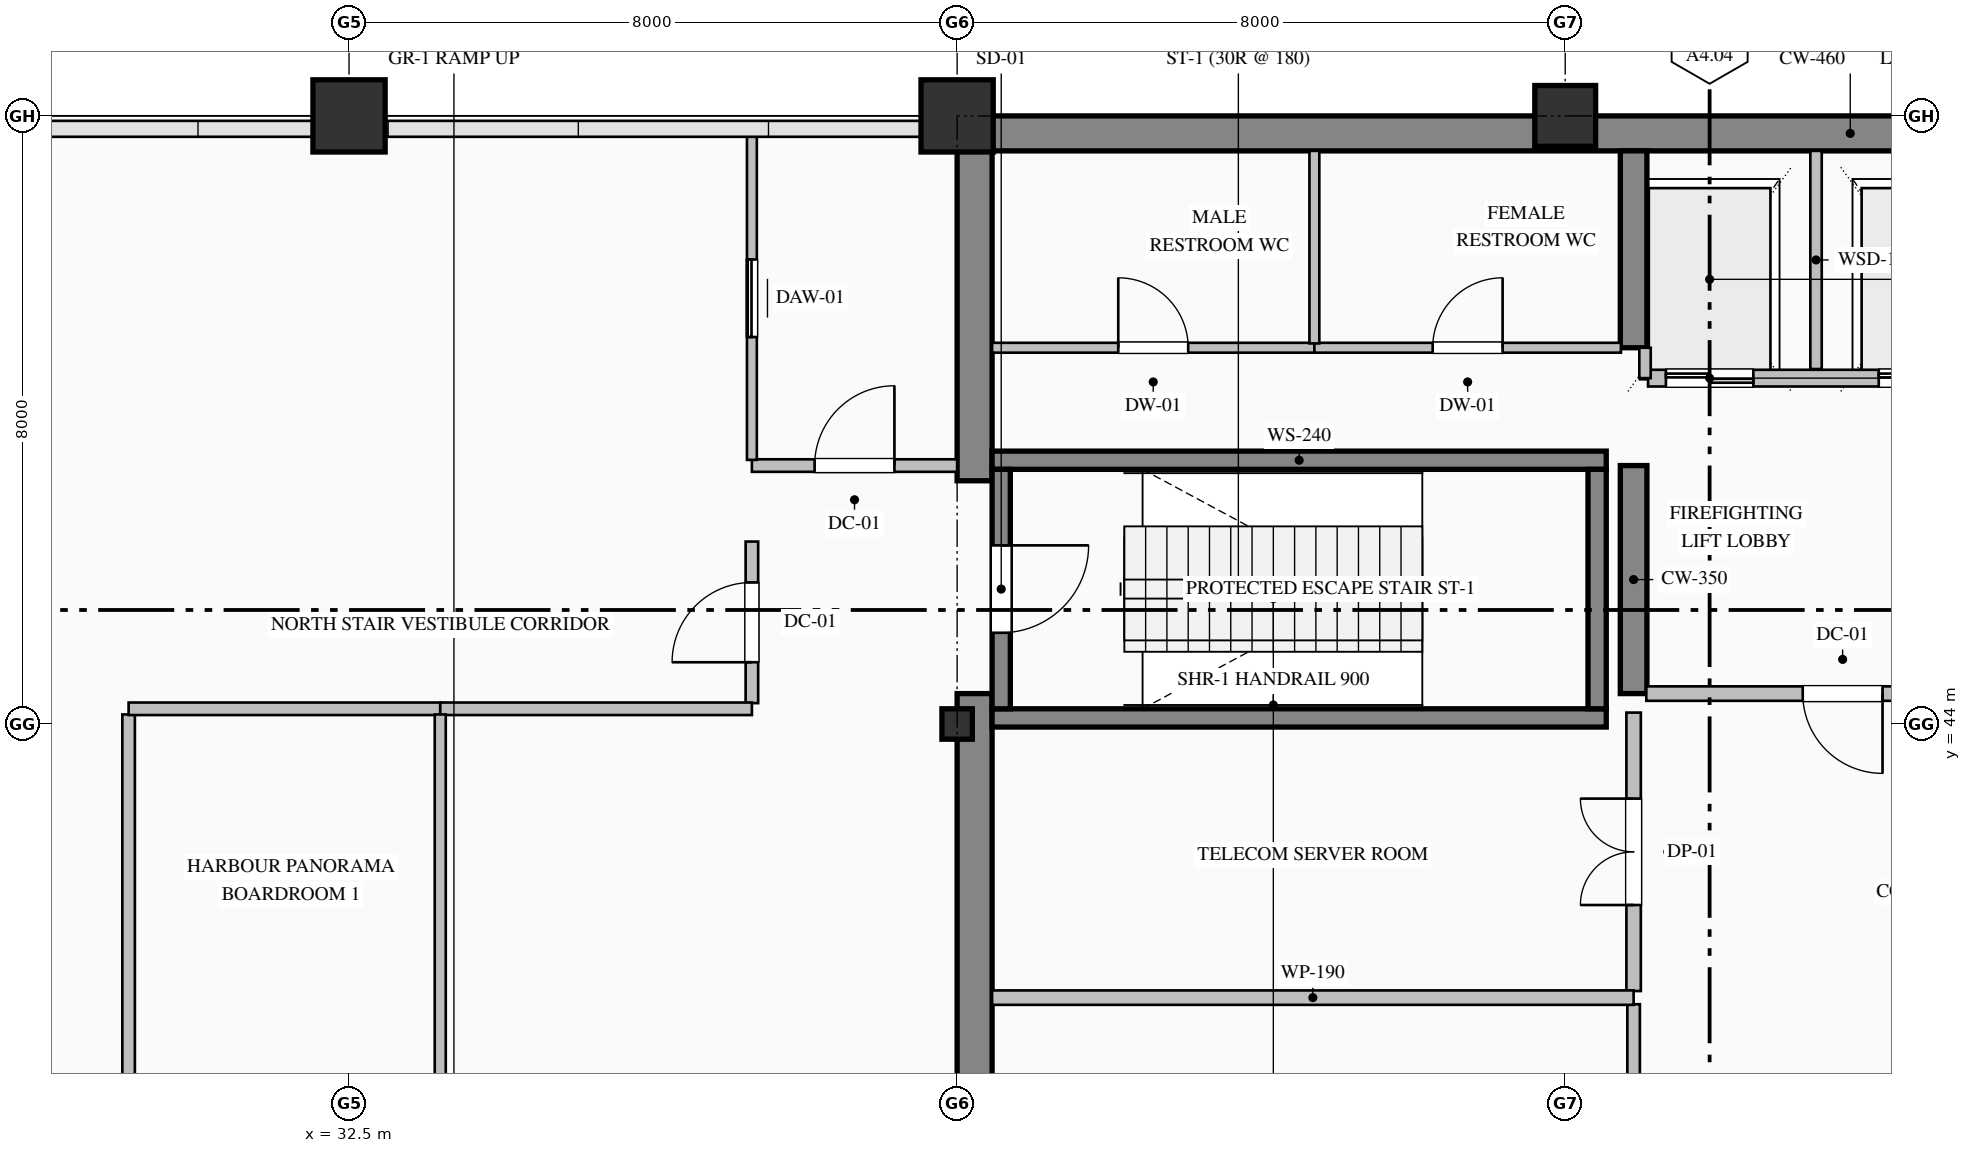
"""IFC4 building model, lengths in metres.
Left out: names, types, materials, properties, quantities, classifications, styles, units other than length and angle.
Written with IfcOpenShell. Run it as: python <this file> out.ifc"""

import sys

from ifc_helpers import new_model, si_unit, direction, frame, frame_2d, origin, origin_2d, place, context, subcontext, project, spatial, rectangle, hollow_rectangle, i_section, extrude, element, fill, save


model = new_model("IFC4")
c1 = context("Model", 3, precision=1e-05, world=origin(), true_north=direction((0.0, 1.0)))
c2 = subcontext(c1, "Body", "Model", "MODEL_VIEW")
j1 = project(units=[si_unit("LENGTHUNIT", "METRE"), si_unit("PLANEANGLEUNIT", "RADIAN")], contexts=[c1])
p1 = place(None, origin())
s1 = spatial("IfcSite", under=j1, at=p1, CompositionType="ELEMENT")
p2 = place(p1, origin())
s2 = spatial("IfcBuilding", under=s1, at=p2, CompositionType="ELEMENT")
p3 = place(p2, frame((0.0, 0.0, 200.4)))
s3 = spatial("IfcBuildingStorey", under=s2, at=p3, CompositionType="ELEMENT", Elevation=200.4)
p4 = place(p3, frame((40.5, 51.77, 0.0), z_axis=(0.0, 0.0, 1.0), x_axis=(1.0, 0.0, 0.0)))
e1 = element("IfcWall", 1, at=p4, inside=s3, PredefinedType="SHEAR", context=c2, shape_type="SweptSolid", body=[
    extrude(rectangle(XDim=23.5, YDim=0.46, at=frame_2d((11.75, 0.0))), origin(), (0.0, 0.0, 1.0), 5.175),
])
p5 = place(p3, frame((40.73, 36.46, 0.0), z_axis=(0.0, 0.0, 1.0), x_axis=(0.0, 1.0, 0.0)))
e2 = element("IfcWall", 2, at=p5, inside=s3, PredefinedType="SHEAR", context=c2, shape_type="SweptSolid", body=[
    extrude(rectangle(XDim=7.94, YDim=0.46, at=frame_2d((3.97, 0.0))), origin(), (0.0, 0.0, 1.0), 5.175),
])
p6 = place(p3, frame((40.73, 47.2, 0.0), z_axis=(0.0, 0.0, 1.0), x_axis=(0.0, 1.0, 0.0)))
e3 = element("IfcWall", 3, at=p6, inside=s3, PredefinedType="SHEAR", context=c2, shape_type="SweptSolid", body=[
    extrude(rectangle(XDim=4.34, YDim=0.46, at=frame_2d((2.17, 0.0))), origin(), (0.0, 0.0, 1.0), 5.175),
])
p7 = place(p3, frame((49.4, 44.4, 0.0), z_axis=(0.0, 0.0, 1.0), x_axis=(0.0, 1.0, 0.0)))
e4 = element("IfcWall", 4, at=p7, inside=s3, PredefinedType="SHEAR", context=c2, shape_type="SweptSolid", body=[
    extrude(rectangle(XDim=3.0, YDim=0.35, at=frame_2d((1.5, 0.0))), origin(), (0.0, 0.0, 1.0), 5.175),
])
p8 = place(p3, frame((49.4, 48.95, 0.0), z_axis=(0.0, 0.0, 1.0), x_axis=(0.0, 1.0, 0.0)))
e5 = element("IfcWall", 5, at=p8, inside=s3, PredefinedType="SHEAR", context=c2, shape_type="SweptSolid", body=[
    extrude(rectangle(XDim=2.59, YDim=0.35, at=frame_2d((1.295, 0.0))), origin(), (0.0, 0.0, 1.0), 5.175),
])
p9 = place(p3, frame((32.5, 52.0, 0.0), z_axis=(0.0, 0.0, 1.0), x_axis=(1.0, 0.0, 0.0)))
e6 = element("IfcColumn", 6, at=p9, inside=s3, PredefinedType="COLUMN", context=c2, shape_type="SweptSolid", body=[
    extrude(hollow_rectangle(XDim=0.95, YDim=0.95, WallThickness=0.036, at=origin_2d()), origin(), (0.0, 0.0, 1.0), 5.4),
])
p10 = place(p3, frame((40.5, 44.0, 0.0), z_axis=(0.0, 0.0, 1.0), x_axis=(1.0, 0.0, 0.0)))
e7 = element("IfcColumn", 7, at=p10, inside=s3, PredefinedType="COLUMN", context=c2, shape_type="SweptSolid", body=[
    extrude(i_section(OverallWidth=0.4, OverallDepth=0.4, WebThickness=0.013, FlangeThickness=0.021, FilletRadius=0.022, at=origin_2d()), origin(), (0.0, 0.0, 1.0), 5.4),
])
p11 = place(p3, frame((40.5, 52.0, 0.0), z_axis=(0.0, 0.0, 1.0), x_axis=(1.0, 0.0, 0.0)))
e8 = element("IfcColumn", 8, at=p11, inside=s3, PredefinedType="COLUMN", context=c2, shape_type="SweptSolid", body=[
    extrude(hollow_rectangle(XDim=0.95, YDim=0.95, WallThickness=0.036, at=origin_2d()), origin(), (0.0, 0.0, 1.0), 5.4),
])
p12 = place(p3, frame((48.5, 52.0, 0.0), z_axis=(0.0, 0.0, 1.0), x_axis=(1.0, 0.0, 0.0)))
e9 = element("IfcColumn", 9, at=p12, inside=s3, PredefinedType="COLUMN", context=c2, shape_type="SweptSolid", body=[
    extrude(hollow_rectangle(XDim=0.8, YDim=0.8, WallThickness=0.032, at=origin_2d()), origin(), (0.0, 0.0, 1.0), 5.4),
])
for number, where, z_axis, x_axis in (
    (10, (40.96, 47.47, 0.0), (0.0, 0.0, 1.0), (1.0, 0.0, 0.0)),
    (11, (49.04, 44.08, 0.0), (0.0, 0.0, 1.0), (-1.0, 0.0, 0.0)),
):
    element("IfcWall", number, at=place(p3, frame(where, z_axis=z_axis, x_axis=x_axis)), inside=s3, PredefinedType="SOLIDWALL", context=c2, shape_type="SweptSolid", body=[
        extrude(rectangle(XDim=8.08, YDim=0.24, at=frame_2d((4.04, 0.0))), origin(), (0.0, 0.0, 1.0), 5.4),
    ])
p13 = place(p3, frame((41.08, 47.35, 0.0), z_axis=(0.0, 0.0, 1.0), x_axis=(0.0, -1.0, 0.0)))
e12 = element("IfcWall", 12, at=p13, inside=s3, PredefinedType="SOLIDWALL", context=c2, shape_type="SweptSolid", body=[
    extrude(rectangle(XDim=3.15, YDim=0.24, at=frame_2d((1.575, 0.0))), origin(), (0.0, 0.0, 1.0), 5.4),
])
p14 = place(p13, frame((1.0, 0.0, 0.0)))
e13 = element("IfcOpeningElement", 13, at=p14, cuts=e12, PredefinedType="OPENING", context=c2, shape_type="SweptSolid", body=[
    extrude(rectangle(XDim=1.15, YDim=2.2, at=frame_2d((0.575, 1.1))), frame((0.0, 0.13, 0.0), z_axis=(0.0, -1.0, 0.0), x_axis=(1.0, 0.0, 0.0)), (0.0, 0.0, 1.0), 0.26),
])
p15 = place(p3, frame((48.92, 44.2, 0.0), z_axis=(0.0, 0.0, 1.0), x_axis=(0.0, 1.0, 0.0)))
e14 = element("IfcWall", 14, at=p15, inside=s3, PredefinedType="SOLIDWALL", context=c2, shape_type="SweptSolid", body=[
    extrude(rectangle(XDim=3.15, YDim=0.24, at=frame_2d((1.575, 0.0))), origin(), (0.0, 0.0, 1.0), 5.4),
])
p16 = place(p3, frame((54.71, 48.55, 0.0), z_axis=(0.0, 0.0, 1.0), x_axis=(-1.0, 0.0, 0.0)))
e15 = element("IfcWall", 15, at=p16, inside=s3, PredefinedType="PARTITIONING", context=c2, shape_type="SweptSolid", body=[
    extrude(rectangle(XDim=5.12, YDim=0.22, at=frame_2d((2.56, 0.0))), origin(), (0.0, 0.0, 1.0), 5.175),
])
p17 = place(p16, frame((3.735, 0.0, 0.0)))
e16 = element("IfcOpeningElement", 16, at=p17, cuts=e15, PredefinedType="OPENING", context=c2, shape_type="SweptSolid", body=[
    extrude(rectangle(XDim=1.15, YDim=2.2, at=frame_2d((0.575, 1.1))), frame((0.0, 0.12, 0.0), z_axis=(0.0, -1.0, 0.0), x_axis=(1.0, 0.0, 0.0)), (0.0, 0.0, 1.0), 0.24),
])
p18 = place(p16, frame((0.935, 0.0, 0.0)))
e17 = element("IfcOpeningElement", 17, at=p18, cuts=e15, PredefinedType="OPENING", context=c2, shape_type="SweptSolid", body=[
    extrude(rectangle(XDim=1.15, YDim=2.2, at=frame_2d((0.575, 1.1))), frame((0.0, 0.12, 0.0), z_axis=(0.0, -1.0, 0.0), x_axis=(1.0, 0.0, 0.0)), (0.0, 0.0, 1.0), 0.24),
])
p19 = place(p3, frame((51.8, 48.67, 0.0), z_axis=(0.0, 0.0, 1.0), x_axis=(0.0, 1.0, 0.0)))
e18 = element("IfcWall", 18, at=p19, inside=s3, PredefinedType="PARTITIONING", context=c2, shape_type="SweptSolid", body=[
    extrude(rectangle(XDim=2.87, YDim=0.15, at=frame_2d((1.435, 0.0))), origin(), (0.0, 0.0, 1.0), 5.175),
])
p20 = place(p3, frame((49.55, 48.55, 0.0), z_axis=(0.0, 0.0, 1.0), x_axis=(0.0, 1.0, 0.0)))
e19 = element("IfcWall", 19, at=p20, inside=s3, PredefinedType="PARTITIONING", context=c2, shape_type="SweptSolid", body=[
    extrude(rectangle(XDim=0.4, YDim=0.15, at=frame_2d((0.2, 0.0))), origin(), (0.0, 0.0, 1.0), 5.175),
])
p21 = place(p3, frame((37.8, 47.4, 0.0), z_axis=(0.0, 0.0, 1.0), x_axis=(1.0, 0.0, 0.0)))
e20 = element("IfcWall", 20, at=p21, inside=s3, PredefinedType="PARTITIONING", context=c2, shape_type="SweptSolid", body=[
    extrude(rectangle(XDim=2.7, YDim=0.165, at=frame_2d((1.35, 0.0))), origin(), (0.0, 0.0, 1.0), 5.175),
])
p22 = place(p21, frame((0.825, 0.0, 0.0)))
e21 = element("IfcOpeningElement", 21, at=p22, cuts=e20, PredefinedType="OPENING", context=c2, shape_type="SweptSolid", body=[
    extrude(rectangle(XDim=1.05, YDim=2.15, at=frame_2d((0.525, 1.075))), frame((0.0, 0.093, 0.0), z_axis=(0.0, -1.0, 0.0), x_axis=(1.0, 0.0, 0.0)), (0.0, 0.0, 1.0), 0.185),
])
p23 = place(p3, frame((37.8, 44.274, 0.0), z_axis=(0.0, 0.0, 1.0), x_axis=(0.0, 1.0, 0.0)))
e22 = element("IfcWall", 22, at=p23, inside=s3, PredefinedType="PARTITIONING", context=c2, shape_type="SweptSolid", body=[
    extrude(rectangle(XDim=2.125, YDim=0.165, at=frame_2d((1.063, 0.0))), origin(), (0.0, 0.0, 1.0), 5.175),
])
p24 = place(p23, frame((0.538, 0.0, 0.0)))
e23 = element("IfcOpeningElement", 23, at=p24, cuts=e22, PredefinedType="OPENING", context=c2, shape_type="SweptSolid", body=[
    extrude(rectangle(XDim=1.05, YDim=2.15, at=frame_2d((0.525, 1.075))), frame((0.0, 0.093, 0.0), z_axis=(0.0, -1.0, 0.0), x_axis=(1.0, 0.0, 0.0)), (0.0, 0.0, 1.0), 0.185),
])
p25 = place(p3, frame((37.8, 47.475, 0.0), z_axis=(0.0, 0.0, 1.0), x_axis=(0.0, 1.0, 0.0)))
e24 = element("IfcWall", 24, at=p25, inside=s3, PredefinedType="PARTITIONING", context=c2, shape_type="SweptSolid", body=[
    extrude(rectangle(XDim=4.253, YDim=0.13, at=frame_2d((2.127, 0.0))), origin(), (0.0, 0.0, 1.0), 5.175),
])
p26 = place(p25, frame((1.617, 0.0, 0.0)))
e25 = element("IfcOpeningElement", 25, at=p26, cuts=e24, PredefinedType="OPENING", context=c2, shape_type="SweptSolid", body=[
    extrude(rectangle(XDim=1.02, YDim=2.15, at=frame_2d((0.51, 1.075))), frame((0.0, 0.075, 0.0), z_axis=(0.0, -1.0, 0.0), x_axis=(1.0, 0.0, 0.0)), (0.0, 0.0, 1.0), 0.15),
])
p27 = place(p3, frame((40.96, 48.95, 0.0), z_axis=(0.0, 0.0, 1.0), x_axis=(1.0, 0.0, 0.0)))
e26 = element("IfcWall", 26, at=p27, inside=s3, PredefinedType="PARTITIONING", context=c2, shape_type="SweptSolid", body=[
    extrude(rectangle(XDim=4.24, YDim=0.13, at=frame_2d((2.12, 0.0))), origin(), (0.0, 0.0, 1.0), 5.175),
])
p28 = place(p27, frame((1.66, 0.0, 0.0)))
e27 = element("IfcOpeningElement", 27, at=p28, cuts=e26, PredefinedType="OPENING", context=c2, shape_type="SweptSolid", body=[
    extrude(rectangle(XDim=0.92, YDim=2.15, at=frame_2d((0.46, 1.075))), frame((0.0, 0.075, 0.0), z_axis=(0.0, -1.0, 0.0), x_axis=(1.0, 0.0, 0.0)), (0.0, 0.0, 1.0), 0.15),
])
p29 = place(p3, frame((45.2, 48.95, 0.0), z_axis=(0.0, 0.0, 1.0), x_axis=(1.0, 0.0, 0.0)))
e28 = element("IfcWall", 28, at=p29, inside=s3, PredefinedType="PARTITIONING", context=c2, shape_type="SweptSolid", body=[
    extrude(rectangle(XDim=4.033, YDim=0.13, at=frame_2d((2.017, 0.0))), origin(), (0.0, 0.0, 1.0), 5.175),
])
p30 = place(p29, frame((1.556, 0.0, 0.0)))
e29 = element("IfcOpeningElement", 29, at=p30, cuts=e28, PredefinedType="OPENING", context=c2, shape_type="SweptSolid", body=[
    extrude(rectangle(XDim=0.92, YDim=2.15, at=frame_2d((0.46, 1.075))), frame((0.0, 0.075, 0.0), z_axis=(0.0, -1.0, 0.0), x_axis=(1.0, 0.0, 0.0)), (0.0, 0.0, 1.0), 0.15),
])
p31 = place(p3, frame((54.733, 44.4, 0.0), z_axis=(0.0, 0.0, 1.0), x_axis=(-1.0, 0.0, 0.0)))
e30 = element("IfcWall", 30, at=p31, inside=s3, PredefinedType="PARTITIONING", context=c2, shape_type="SweptSolid", body=[
    extrude(rectangle(XDim=5.166, YDim=0.19, at=frame_2d((2.583, 0.0))), origin(), (0.0, 0.0, 1.0), 5.175),
])
p32 = place(p31, frame((2.058, 0.0, 0.0)))
e31 = element("IfcOpeningElement", 31, at=p32, cuts=e30, PredefinedType="OPENING", context=c2, shape_type="SweptSolid", body=[
    extrude(rectangle(XDim=1.05, YDim=2.15, at=frame_2d((0.525, 1.075))), frame((0.0, 0.105, 0.0), z_axis=(0.0, -1.0, 0.0), x_axis=(1.0, 0.0, 0.0)), (0.0, 0.0, 1.0), 0.21),
])
p33 = place(p3, frame((49.4, 36.46, 0.0), z_axis=(0.0, 0.0, 1.0), x_axis=(0.0, 1.0, 0.0)))
e32 = element("IfcWall", 32, at=p33, inside=s3, PredefinedType="PARTITIONING", context=c2, shape_type="SweptSolid", body=[
    extrude(rectangle(XDim=3.853, YDim=0.165, at=frame_2d((1.927, 0.0))), origin(), (0.0, 0.0, 1.0), 4.417),
])
p34 = place(p33, frame((1.477, 0.0, 0.0)))
e33 = element("IfcOpeningElement", 33, at=p34, cuts=e32, PredefinedType="OPENING", context=c2, shape_type="SweptSolid", body=[
    extrude(rectangle(XDim=0.9, YDim=2.15, at=frame_2d((0.45, 1.075))), frame((0.0, 0.093, 0.0), z_axis=(0.0, -1.0, 0.0), x_axis=(1.0, 0.0, 0.0)), (0.0, 0.0, 1.0), 0.185),
])
p35 = place(p3, frame((49.4, 40.487, 0.0), z_axis=(0.0, 0.0, 1.0), x_axis=(0.0, 1.0, 0.0)))
e34 = element("IfcWall", 34, at=p35, inside=s3, PredefinedType="PARTITIONING", context=c2, shape_type="SweptSolid", body=[
    extrude(rectangle(XDim=3.663, YDim=0.19, at=frame_2d((1.832, 0.0))), origin(), (0.0, 0.0, 1.0), 4.417),
])
p36 = place(p35, frame((1.132, 0.0, 0.0)))
e35 = element("IfcOpeningElement", 35, at=p36, cuts=e34, PredefinedType="OPENING", context=c2, shape_type="SweptSolid", body=[
    extrude(rectangle(XDim=1.4, YDim=2.25, at=frame_2d((0.7, 1.125))), frame((0.0, 0.105, 0.0), z_axis=(0.0, -1.0, 0.0), x_axis=(1.0, 0.0, 0.0)), (0.0, 0.0, 1.0), 0.21),
])
p37 = place(p3, frame((40.96, 40.4, 0.0), z_axis=(0.0, 0.0, 1.0), x_axis=(1.0, 0.0, 0.0)))
e36 = element("IfcWall", 36, at=p37, inside=s3, PredefinedType="PARTITIONING", context=c2, shape_type="SweptSolid", body=[
    extrude(rectangle(XDim=8.44, YDim=0.19, at=frame_2d((4.22, 0.0))), origin(), (0.0, 0.0, 1.0), 5.175),
])
p38 = place(p3, frame((45.2, 51.54, 0.0), z_axis=(0.0, 0.0, 1.0), x_axis=(0.0, -1.0, 0.0)))
e37 = element("IfcWall", 37, at=p38, inside=s3, PredefinedType="PARTITIONING", context=c2, shape_type="SweptSolid", body=[
    extrude(rectangle(XDim=2.533, YDim=0.13, at=frame_2d((1.267, 0.0))), origin(), (0.0, 0.0, 1.0), 5.175),
])
p39 = place(p3, frame((29.6, 44.125, 0.0), z_axis=(0.0, 0.0, 1.0), x_axis=(0.0, -1.0, 0.0)))
e38 = element("IfcWall", 38, at=p39, inside=s3, PredefinedType="PARTITIONING", context=c2, shape_type="SweptSolid", body=[
    extrude(rectangle(XDim=11.451, YDim=0.165, at=frame_2d((5.726, 0.0))), origin(), (0.0, 0.0, 1.0), 5.175),
])
p40 = place(p39, frame((5.176, 0.0, 0.0)))
e39 = element("IfcOpeningElement", 39, at=p40, cuts=e38, PredefinedType="OPENING", context=c2, shape_type="SweptSolid", body=[
    extrude(rectangle(XDim=1.1, YDim=2.2, at=frame_2d((0.55, 1.1))), frame((0.0, 0.093, 0.0), z_axis=(0.0, -1.0, 0.0), x_axis=(1.0, 0.0, 0.0)), (0.0, 0.0, 1.0), 0.185),
])
p41 = place(p3, frame((33.7, 44.2, 0.0), z_axis=(0.0, 0.0, 1.0), x_axis=(-1.0, 0.0, 0.0)))
e40 = element("IfcWall", 40, at=p41, inside=s3, PredefinedType="PARTITIONING", context=c2, shape_type="SweptSolid", body=[
    extrude(rectangle(XDim=4.1, YDim=0.165, at=frame_2d((2.05, 0.0))), origin(), (0.0, 0.0, 1.0), 5.175),
])
p42 = place(p3, frame((37.8, 44.2, 0.0), z_axis=(0.0, 0.0, 1.0), x_axis=(-1.0, 0.0, 0.0)))
e41 = element("IfcWall", 41, at=p42, inside=s3, PredefinedType="PARTITIONING", context=c2, shape_type="SweptSolid", body=[
    extrude(rectangle(XDim=4.1, YDim=0.165, at=frame_2d((2.05, 0.0))), origin(), (0.0, 0.0, 1.0), 5.175),
])
p43 = place(p3, frame((33.7, 44.125, 0.0), z_axis=(0.0, 0.0, 1.0), x_axis=(0.0, -1.0, 0.0)))
e42 = element("IfcWall", 42, at=p43, inside=s3, PredefinedType="PARTITIONING", context=c2, shape_type="SweptSolid", body=[
    extrude(rectangle(XDim=11.451, YDim=0.145, at=frame_2d((5.726, 0.0))), origin(), (0.0, 0.0, 1.0), 5.175),
])
p44 = place(p14, origin())
e43 = element("IfcDoor", 43, at=p44, inside=s3, OperationType="SINGLE_SWING_LEFT", PredefinedType="DOOR", context=c2, shape_type="SweptSolid", body=[
    extrude(rectangle(XDim=1.15, YDim=2.2, at=frame_2d((0.575, 1.1))), frame((0.0, 0.025, 0.0), z_axis=(0.0, -1.0, 0.0), x_axis=(1.0, 0.0, 0.0)), (0.0, 0.0, 1.0), 0.05),
])
fill(e13, e43)
p45 = place(p17, origin())
e44 = element("IfcDoor", 44, at=p45, inside=s3, OperationType="DOUBLE_DOOR_SLIDING", PredefinedType="DOOR", context=c2, shape_type="SweptSolid", body=[
    extrude(rectangle(XDim=1.15, YDim=2.2, at=frame_2d((0.575, 1.1))), frame((0.0, 0.025, 0.0), z_axis=(0.0, -1.0, 0.0), x_axis=(1.0, 0.0, 0.0)), (0.0, 0.0, 1.0), 0.05),
])
fill(e16, e44)
p46 = place(p18, origin())
e45 = element("IfcDoor", 45, at=p46, inside=s3, OperationType="DOUBLE_DOOR_SLIDING", PredefinedType="DOOR", context=c2, shape_type="SweptSolid", body=[
    extrude(rectangle(XDim=1.15, YDim=2.2, at=frame_2d((0.575, 1.1))), frame((0.0, 0.025, 0.0), z_axis=(0.0, -1.0, 0.0), x_axis=(1.0, 0.0, 0.0)), (0.0, 0.0, 1.0), 0.05),
])
fill(e17, e45)
p47 = place(p32, origin())
e46 = element("IfcDoor", 46, at=p47, inside=s3, OperationType="SINGLE_SWING_LEFT", PredefinedType="DOOR", context=c2, shape_type="SweptSolid", body=[
    extrude(rectangle(XDim=1.05, YDim=2.15, at=frame_2d((0.525, 1.075))), frame((0.0, 0.025, 0.0), z_axis=(0.0, -1.0, 0.0), x_axis=(1.0, 0.0, 0.0)), (0.0, 0.0, 1.0), 0.05),
])
fill(e31, e46)
p48 = place(p22, origin())
e47 = element("IfcDoor", 47, at=p48, inside=s3, OperationType="SINGLE_SWING_RIGHT", PredefinedType="DOOR", context=c2, shape_type="SweptSolid", body=[
    extrude(rectangle(XDim=1.05, YDim=2.15, at=frame_2d((0.525, 1.075))), frame((0.0, 0.025, 0.0), z_axis=(0.0, -1.0, 0.0), x_axis=(1.0, 0.0, 0.0)), (0.0, 0.0, 1.0), 0.05),
])
fill(e21, e47)
p49 = place(p24, origin())
e48 = element("IfcDoor", 48, at=p49, inside=s3, OperationType="SINGLE_SWING_LEFT", PredefinedType="DOOR", context=c2, shape_type="SweptSolid", body=[
    extrude(rectangle(XDim=1.05, YDim=2.15, at=frame_2d((0.525, 1.075))), frame((0.0, 0.025, 0.0), z_axis=(0.0, -1.0, 0.0), x_axis=(1.0, 0.0, 0.0)), (0.0, 0.0, 1.0), 0.05),
])
fill(e23, e48)
p50 = place(p26, origin())
e49 = element("IfcDoor", 49, at=p50, inside=s3, OperationType="SLIDING_TO_LEFT", PredefinedType="DOOR", context=c2, shape_type="SweptSolid", body=[
    extrude(rectangle(XDim=1.02, YDim=2.15, at=frame_2d((0.51, 1.075))), frame((0.0, 0.025, 0.0), z_axis=(0.0, -1.0, 0.0), x_axis=(1.0, 0.0, 0.0)), (0.0, 0.0, 1.0), 0.05),
])
fill(e25, e49)
p51 = place(p36, origin())
e50 = element("IfcDoor", 50, at=p51, inside=s3, OperationType="DOUBLE_DOOR_SINGLE_SWING", PredefinedType="DOOR", context=c2, shape_type="SweptSolid", body=[
    extrude(rectangle(XDim=1.4, YDim=2.25, at=frame_2d((0.7, 1.125))), frame((0.0, 0.025, 0.0), z_axis=(0.0, -1.0, 0.0), x_axis=(1.0, 0.0, 0.0)), (0.0, 0.0, 1.0), 0.05),
])
fill(e35, e50)
p52 = place(p28, origin())
e51 = element("IfcDoor", 51, at=p52, inside=s3, OperationType="SINGLE_SWING_LEFT", PredefinedType="DOOR", context=c2, shape_type="SweptSolid", body=[
    extrude(rectangle(XDim=0.92, YDim=2.15, at=frame_2d((0.46, 1.075))), frame((0.0, 0.025, 0.0), z_axis=(0.0, -1.0, 0.0), x_axis=(1.0, 0.0, 0.0)), (0.0, 0.0, 1.0), 0.05),
])
fill(e27, e51)
p53 = place(p30, origin())
e52 = element("IfcDoor", 52, at=p53, inside=s3, OperationType="SINGLE_SWING_RIGHT", PredefinedType="DOOR", context=c2, shape_type="SweptSolid", body=[
    extrude(rectangle(XDim=0.92, YDim=2.15, at=frame_2d((0.46, 1.075))), frame((0.0, 0.025, 0.0), z_axis=(0.0, -1.0, 0.0), x_axis=(1.0, 0.0, 0.0)), (0.0, 0.0, 1.0), 0.05),
])
fill(e29, e52)
save(model, sys.argv[1])
